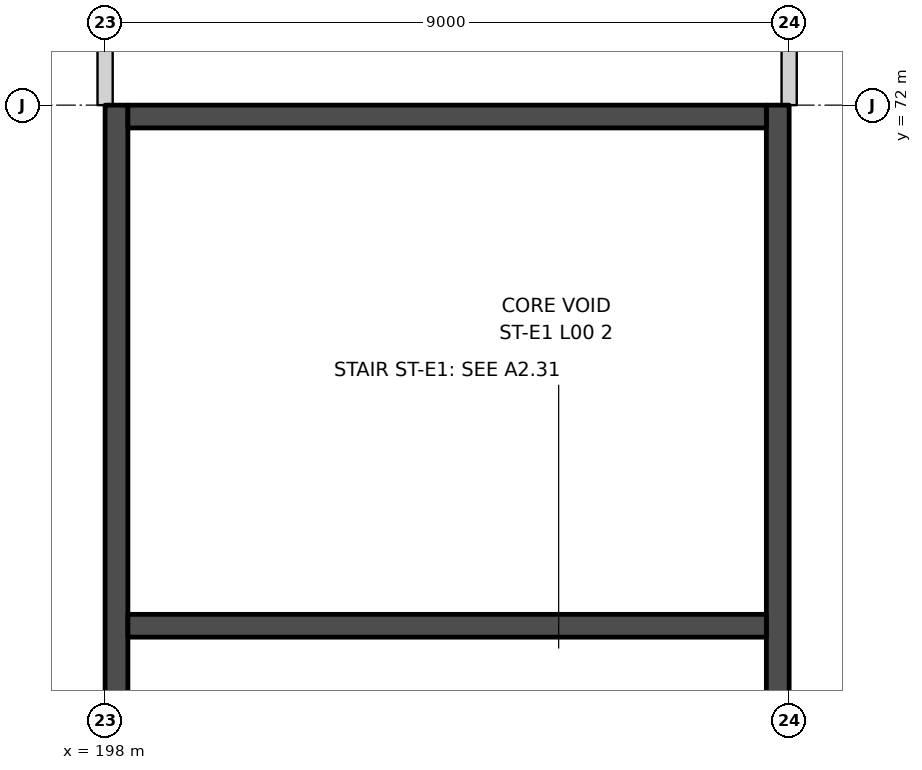
"""IFC4 building model, lengths in metres.
Left out: names, types, materials, properties, quantities, classifications, styles, units other than length and angle.
Written with IfcOpenShell. Run it as: python <this file> out.ifc"""

import sys

from ifc_helpers import new_model, si_unit, direction, frame, frame_2d, origin, place, context, subcontext, project, spatial, rectangle, extrude, element, save


model = new_model("IFC4")
c1 = context("Model", 3, precision=1e-05, world=origin(), true_north=direction((0.0, 1.0)))
c2 = subcontext(c1, "Body", "Model", "MODEL_VIEW")
j1 = project(units=[si_unit("LENGTHUNIT", "METRE"), si_unit("PLANEANGLEUNIT", "RADIAN")], contexts=[c1])
p1 = place(None, origin())
s1 = spatial("IfcSite", under=j1, at=p1, CompositionType="ELEMENT")
p2 = place(p1, origin())
s2 = spatial("IfcBuilding", under=s1, at=p2, CompositionType="ELEMENT")
p3 = place(p2, origin())
s3 = spatial("IfcBuildingStorey", under=s2, at=p3, CompositionType="ELEMENT", Elevation=0.0)
p4 = place(p3, frame((198.0, 72.0, 0.0), z_axis=(0.0, 0.0, 1.0), x_axis=(0.0, 1.0, 0.0)))
e1 = element("IfcWall", 1, at=p4, inside=s3, PredefinedType="PARTITIONING", context=c2, shape_type="SweptSolid", body=[
    extrude(rectangle(XDim=8.55, YDim=0.2, at=frame_2d((4.275, 0.0))), origin(), (0.0, 0.0, 1.0), 5.65),
])
p5 = place(p4, frame((3.375, 0.0, 0.0)))
e2 = element("IfcOpeningElement", 2, at=p5, cuts=e1, PredefinedType="OPENING", context=c2, shape_type="SweptSolid", body=[
    extrude(rectangle(XDim=1.8, YDim=2.1, at=frame_2d((0.9, 1.05))), frame((0.0, 0.11, 0.0), z_axis=(0.0, -1.0, 0.0), x_axis=(1.0, 0.0, 0.0)), (0.0, 0.0, 1.0), 0.22),
])
p6 = place(p3, frame((207.0, 72.0, 0.0), z_axis=(0.0, 0.0, 1.0), x_axis=(0.0, 1.0, 0.0)))
e3 = element("IfcWall", 3, at=p6, inside=s3, PredefinedType="PARTITIONING", context=c2, shape_type="SweptSolid", body=[
    extrude(rectangle(XDim=8.5, YDim=0.2, at=frame_2d((4.25, 0.0))), origin(), (0.0, 0.0, 1.0), 5.65),
])
p7 = place(p3, frame((198.15, 54.0, 0.0), z_axis=(0.0, 0.0, 1.0), x_axis=(0.0, 1.0, 0.0)))
e4 = element("IfcWall", 4, at=p7, inside=s3, PredefinedType="SHEAR", context=c2, shape_type="SweptSolid", body=[
    extrude(rectangle(XDim=18.0, YDim=0.3, at=frame_2d((9.0, 0.0))), origin(), (0.0, 0.0, 1.0), 7.0),
])
p8 = place(p7, frame((8.6, 0.0, 0.0)))
e5 = element("IfcOpeningElement", 5, at=p8, cuts=e4, PredefinedType="OPENING", context=c2, shape_type="SweptSolid", body=[
    extrude(rectangle(XDim=1.2, YDim=2.1, at=frame_2d((0.6, 1.05))), frame((0.0, 0.16, 0.0), z_axis=(0.0, -1.0, 0.0), x_axis=(1.0, 0.0, 0.0)), (0.0, 0.0, 1.0), 0.32),
])
p9 = place(p3, frame((206.85, 54.0, 0.0), z_axis=(0.0, 0.0, 1.0), x_axis=(0.0, 1.0, 0.0)))
e6 = element("IfcWall", 6, at=p9, inside=s3, PredefinedType="SHEAR", context=c2, shape_type="SweptSolid", body=[
    extrude(rectangle(XDim=18.0, YDim=0.3, at=frame_2d((9.0, 0.0))), origin(), (0.0, 0.0, 1.0), 7.0),
])
for number, where, z_axis, x_axis in (
    (7, (198.3, 71.85, 0.0), (0.0, 0.0, 1.0), (1.0, 0.0, 0.0)),
    (8, (198.3, 65.15, 0.0), (0.0, 0.0, 1.0), (1.0, 0.0, 0.0)),
):
    element("IfcWall", number, at=place(p3, frame(where, z_axis=z_axis, x_axis=x_axis)), inside=s3, PredefinedType="SHEAR", context=c2, shape_type="SweptSolid", body=[
        extrude(rectangle(XDim=8.4, YDim=0.3, at=frame_2d((4.2, 0.0))), origin(), (0.0, 0.0, 1.0), 7.0),
    ])
save(model, sys.argv[1])
